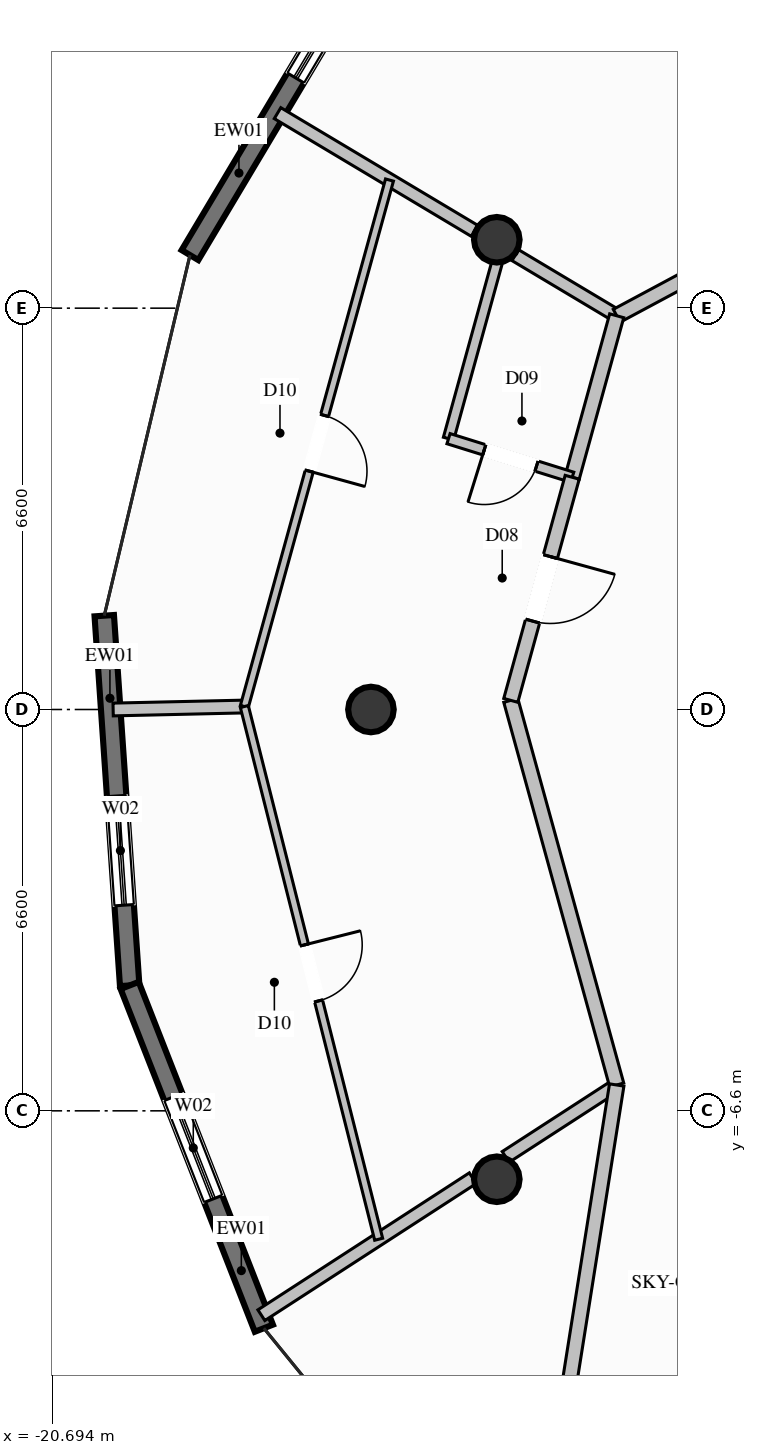
"""IFC4 building model, lengths in metres.
Left out: names, types, materials, properties, quantities, classifications, styles, units other than length and angle.
Written with IfcOpenShell. Run it as: python <this file> out.ifc"""

import sys

from ifc_helpers import new_model, si_unit, direction, frame, frame_2d, origin, origin_2d, place, context, subcontext, project, spatial, rectangle, circle, extrude, element, fill, save


model = new_model("IFC4")
c1 = context("Model", 3, precision=1e-05, world=origin(), true_north=direction((0.0, 1.0)))
c2 = subcontext(c1, "Body", "Model", "MODEL_VIEW")
j1 = project(units=[si_unit("LENGTHUNIT", "METRE"), si_unit("PLANEANGLEUNIT", "RADIAN")], contexts=[c1])
p1 = place(None, origin())
s1 = spatial("IfcSite", under=j1, at=p1, CompositionType="ELEMENT")
p2 = place(p1, origin())
s2 = spatial("IfcBuilding", under=s1, at=p2, CompositionType="ELEMENT")
p3 = place(p2, frame((0.0, 0.0, 293.4)))
s3 = spatial("IfcBuildingStorey", under=s2, at=p3, CompositionType="ELEMENT", Elevation=293.4)
for number, where, z_axis, x_axis in (
    (1, (-13.38, 7.725, 0.0), (0.0, 0.0, 1.0), (1.0, 0.0, 0.0)),
    (2, (-15.45, 0.0, 0.0), (0.0, 0.0, 1.0), (1.0, 0.0, 0.0)),
    (3, (-13.38, -7.725, 0.0), (0.0, 0.0, 1.0), (1.0, 0.0, 0.0)),
):
    element("IfcColumn", number, at=place(p3, frame(where, z_axis=z_axis, x_axis=x_axis)), inside=s3, PredefinedType="COLUMN", context=c2, shape_type="SweptSolid", body=[
        extrude(circle(Radius=0.375, at=origin_2d()), origin(), (0.0, 0.0, 1.0), 3.8),
    ])
p4 = place(p3, frame((-18.426, 7.473, 0.0), z_axis=(0.0, 0.0, 1.0), x_axis=(0.512459907896, 0.858711152134, 0.0)))
e4 = element("IfcWall", 4, at=p4, inside=s3, PredefinedType="SOLIDWALL", context=c2, shape_type="SweptSolid", body=[
    extrude(rectangle(XDim=6.053, YDim=0.32, at=frame_2d((3.027, 0.0))), origin(), (0.0, 0.0, 1.0), 3.57),
])
p5 = place(p4, frame((3.392, 0.0, 0.35)))
e5 = element("IfcOpeningElement", 5, at=p5, cuts=e4, PredefinedType="OPENING", context=c2, shape_type="SweptSolid", body=[
    extrude(rectangle(XDim=1.8, YDim=2.6, at=frame_2d((0.9, 1.3))), frame((0.0, 0.17, 0.0), z_axis=(0.0, -1.0, 0.0), x_axis=(1.0, 0.0, 0.0)), (0.0, 0.0, 1.0), 0.34),
])
p6 = place(p3, frame((-19.418, -4.538, 0.0), z_axis=(0.0, 0.0, 1.0), x_axis=(-0.068571155559, 0.997646228192, 0.0)))
e6 = element("IfcWall", 6, at=p6, inside=s3, PredefinedType="SOLIDWALL", context=c2, shape_type="SweptSolid", body=[
    extrude(rectangle(XDim=6.095, YDim=0.32, at=frame_2d((3.048, 0.0))), origin(), (0.0, 0.0, 1.0), 3.57),
])
p7 = place(p6, frame((1.323, 0.0, 0.35)))
e7 = element("IfcOpeningElement", 7, at=p7, cuts=e6, PredefinedType="OPENING", context=c2, shape_type="SweptSolid", body=[
    extrude(rectangle(XDim=1.8, YDim=2.6, at=frame_2d((0.9, 1.3))), frame((0.0, 0.17, 0.0), z_axis=(0.0, -1.0, 0.0), x_axis=(1.0, 0.0, 0.0)), (0.0, 0.0, 1.0), 0.34),
])
p8 = place(p3, frame((-17.211, -10.175, 0.0), z_axis=(0.0, 0.0, 1.0), x_axis=(-0.364580296342, 0.931171953787, 0.0)))
e8 = element("IfcWall", 8, at=p8, inside=s3, PredefinedType="SOLIDWALL", context=c2, shape_type="SweptSolid", body=[
    extrude(rectangle(XDim=6.054, YDim=0.32, at=frame_2d((3.027, 0.0))), origin(), (0.0, 0.0, 1.0), 3.57),
])
p9 = place(p8, frame((2.284, 0.0, 0.35)))
e9 = element("IfcOpeningElement", 9, at=p9, cuts=e8, PredefinedType="OPENING", context=c2, shape_type="SweptSolid", body=[
    extrude(rectangle(XDim=1.8, YDim=2.6, at=frame_2d((0.9, 1.3))), frame((0.0, 0.17, 0.0), z_axis=(0.0, -1.0, 0.0), x_axis=(1.0, 0.0, 0.0)), (0.0, 0.0, 1.0), 0.34),
])
p10 = place(p3, frame((-11.408, 6.475, 0.0), z_axis=(0.0, 0.0, 1.0), x_axis=(-0.858521768477, 0.512777118299, 0.0)))
e10 = element("IfcWall", 10, at=p10, inside=s3, PredefinedType="PARTITIONING", context=c2, shape_type="SweptSolid", body=[
    extrude(rectangle(XDim=1.944, YDim=0.21, at=frame_2d((0.972, 0.0))), origin(), (0.0, 0.0, 1.0), 3.011),
])
p11 = place(p3, frame((-13.747, 7.872, 0.0), z_axis=(0.0, 0.0, 1.0), x_axis=(-0.858496185015, 0.512819949216, 0.0)))
e11 = element("IfcWall", 11, at=p11, inside=s3, PredefinedType="PARTITIONING", context=c2, shape_type="SweptSolid", body=[
    extrude(rectangle(XDim=3.773, YDim=0.21, at=frame_2d((1.886, 0.0))), origin(), (0.0, 0.0, 1.0), 3.57),
])
p12 = place(p3, frame((-11.408, -6.175, 0.0), z_axis=(0.0, 0.0, 1.0), x_axis=(-0.83928100766, -0.543697885026, 0.0)))
e12 = element("IfcWall", 12, at=p12, inside=s3, PredefinedType="PARTITIONING", context=c2, shape_type="SweptSolid", body=[
    extrude(rectangle(XDim=2.176, YDim=0.21, at=frame_2d((1.088, 0.0))), origin(), (0.0, 0.0, 1.0), 3.011),
])
p13 = place(p3, frame((-13.775, -7.708, 0.0), z_axis=(0.0, 0.0, 1.0), x_axis=(-0.83923166981, -0.543774037987, 0.0)))
e13 = element("IfcWall", 13, at=p13, inside=s3, PredefinedType="PARTITIONING", context=c2, shape_type="SweptSolid", body=[
    extrude(rectangle(XDim=4.143, YDim=0.21, at=frame_2d((2.072, 0.0))), origin(), (0.0, 0.0, 1.0), 3.57),
])
p14 = place(p3, frame((-11.408, 6.475, 0.0), z_axis=(0.0, 0.0, 1.0), x_axis=(0.881394026477, 0.472381805418, 0.0)))
e14 = element("IfcWall", 14, at=p14, inside=s3, PredefinedType="PARTITIONING", context=c2, shape_type="SweptSolid", body=[
    extrude(rectangle(XDim=4.604, YDim=0.24, at=frame_2d((2.302, 0.0))), origin(), (0.0, 0.0, 1.0), 3.57),
])
p15 = place(p14, frame((1.802, 0.0, 0.0)))
e15 = element("IfcOpeningElement", 15, at=p15, cuts=e14, PredefinedType="OPENING", context=c2, shape_type="SweptSolid", body=[
    extrude(rectangle(XDim=1.0, YDim=2.2, at=frame_2d((0.5, 1.1))), frame((0.0, 0.13, 0.0), z_axis=(0.0, -1.0, 0.0), x_axis=(1.0, 0.0, 0.0)), (0.0, 0.0, 1.0), 0.26),
])
p16 = place(p3, frame((-11.408, 6.475, 0.0), z_axis=(0.0, 0.0, 1.0), x_axis=(-0.265673419644, -0.964063086159, 0.0)))
e16 = element("IfcWall", 16, at=p16, inside=s3, PredefinedType="PARTITIONING", context=c2, shape_type="SweptSolid", body=[
    extrude(rectangle(XDim=2.755, YDim=0.24, at=frame_2d((1.377, 0.0))), origin(), (0.0, 0.0, 1.0), 3.57),
])
p17 = place(p3, frame((-13.305, 7.608, 0.0), z_axis=(0.0, 0.0, 1.0), x_axis=(-0.265680279944, -0.964061195593, 0.0)))
e17 = element("IfcWall", 17, at=p17, inside=s3, PredefinedType="PLUMBINGWALL", context=c2, shape_type="SweptSolid", body=[
    extrude(rectangle(XDim=3.271, YDim=0.175, at=frame_2d((1.636, 0.0))), origin(), (0.0, 0.0, 1.0), 3.138),
])
p18 = place(p3, frame((-12.14, 3.819, 0.0), z_axis=(0.0, 0.0, 1.0), x_axis=(-0.954569631216, 0.297987951367, 0.0)))
e18 = element("IfcWall", 18, at=p18, inside=s3, PredefinedType="PLUMBINGWALL", context=c2, shape_type="SweptSolid", body=[
    extrude(rectangle(XDim=2.131, YDim=0.175, at=frame_2d((1.065, 0.0))), origin(), (0.0, 0.0, 1.0), 3.57),
])
p19 = place(p18, frame((0.615, 0.0, 0.0)))
e19 = element("IfcOpeningElement", 19, at=p19, cuts=e18, PredefinedType="OPENING", context=c2, shape_type="SweptSolid", body=[
    extrude(rectangle(XDim=0.9, YDim=2.1, at=frame_2d((0.45, 1.05))), frame((0.0, 0.098, 0.0), z_axis=(0.0, -1.0, 0.0), x_axis=(1.0, 0.0, 0.0)), (0.0, 0.0, 1.0), 0.195),
])
p20 = place(p3, frame((-17.532, 0.049, 0.0), z_axis=(0.0, 0.0, 1.0), x_axis=(-0.999741543501, -0.02273425164, 0.0)))
e20 = element("IfcWall", 20, at=p20, inside=s3, PredefinedType="PARTITIONING", context=c2, shape_type="SweptSolid", body=[
    extrude(rectangle(XDim=2.158, YDim=0.21, at=frame_2d((1.079, 0.0))), origin(), (0.0, 0.0, 1.0), 3.57),
])
p21 = place(p3, frame((-13.15, 0.15, 0.0), z_axis=(0.0, 0.0, 1.0), x_axis=(0.265522333736, -0.964104709193, 0.0)))
e21 = element("IfcWall", 21, at=p21, inside=s3, PredefinedType="PARTITIONING", context=c2, shape_type="SweptSolid", body=[
    extrude(rectangle(XDim=6.561, YDim=0.24, at=frame_2d((3.28, 0.0))), origin(), (0.0, 0.0, 1.0), 3.57),
])
p22 = place(p3, frame((-12.14, 3.819, 0.0), z_axis=(0.0, 0.0, 1.0), x_axis=(-0.265396531994, -0.964139347193, 0.0)))
e22 = element("IfcWall", 22, at=p22, inside=s3, PredefinedType="PARTITIONING", context=c2, shape_type="SweptSolid", body=[
    extrude(rectangle(XDim=3.806, YDim=0.24, at=frame_2d((1.903, 0.0))), origin(), (0.0, 0.0, 1.0), 3.57),
])
p23 = place(p22, frame((1.353, 0.0, 0.0)))
e23 = element("IfcOpeningElement", 23, at=p23, cuts=e22, PredefinedType="OPENING", context=c2, shape_type="SweptSolid", body=[
    extrude(rectangle(XDim=1.1, YDim=2.3, at=frame_2d((0.55, 1.15))), frame((0.0, 0.13, 0.0), z_axis=(0.0, -1.0, 0.0), x_axis=(1.0, 0.0, 0.0)), (0.0, 0.0, 1.0), 0.26),
])
p24 = place(p3, frame((-15.145, 8.707, 0.0), z_axis=(0.0, 0.0, 1.0), x_axis=(-0.265780037486, -0.964033698412, 0.0)))
e24 = element("IfcWall", 24, at=p24, inside=s3, PredefinedType="PARTITIONING", context=c2, shape_type="SweptSolid", body=[
    extrude(rectangle(XDim=8.981, YDim=0.135, at=frame_2d((4.49, 0.0))), origin(), (0.0, 0.0, 1.0), 3.57),
])
p25 = place(p24, frame((4.016, 0.0, 0.0)))
e25 = element("IfcOpeningElement", 25, at=p25, cuts=e24, PredefinedType="OPENING", context=c2, shape_type="SweptSolid", body=[
    extrude(rectangle(XDim=0.95, YDim=2.1, at=frame_2d((0.475, 1.05))), frame((0.0, 0.078, 0.0), z_axis=(0.0, -1.0, 0.0), x_axis=(1.0, 0.0, 0.0)), (0.0, 0.0, 1.0), 0.155),
])
p26 = place(p3, frame((-17.532, 0.049, 0.0), z_axis=(0.0, 0.0, 1.0), x_axis=(0.244487012049, -0.969652567129, 0.0)))
e26 = element("IfcWall", 26, at=p26, inside=s3, PredefinedType="PARTITIONING", context=c2, shape_type="SweptSolid", body=[
    extrude(rectangle(XDim=9.035, YDim=0.135, at=frame_2d((4.518, 0.0))), origin(), (0.0, 0.0, 1.0), 3.57),
])
p27 = place(p26, frame((4.043, 0.0, 0.0)))
e27 = element("IfcOpeningElement", 27, at=p27, cuts=e26, PredefinedType="OPENING", context=c2, shape_type="SweptSolid", body=[
    extrude(rectangle(XDim=0.95, YDim=2.1, at=frame_2d((0.475, 1.05))), frame((0.0, 0.078, 0.0), z_axis=(0.0, -1.0, 0.0), x_axis=(1.0, 0.0, 0.0)), (0.0, 0.0, 1.0), 0.155),
])
p28 = place(p3, frame((-11.408, -6.175, 0.0), z_axis=(0.0, 0.0, 1.0), x_axis=(-0.156636128869, -0.987656379078, 0.0)))
e28 = element("IfcWall", 28, at=p28, inside=s3, PredefinedType="PARTITIONING", context=c2, shape_type="SweptSolid", body=[
    extrude(rectangle(XDim=5.695, YDim=0.24, at=frame_2d((2.848, 0.0))), origin(), (0.0, 0.0, 1.0), 3.57),
])
p29 = place(p5, origin())
e29 = element("IfcWindow", 29, at=p29, inside=s3, PartitioningType="SINGLE_PANEL", PredefinedType="WINDOW", context=c2, shape_type="SweptSolid", body=[
    extrude(rectangle(XDim=1.8, YDim=2.6, at=frame_2d((0.9, 1.3))), frame((0.0, 0.03, 0.0), z_axis=(0.0, -1.0, 0.0), x_axis=(1.0, 0.0, 0.0)), (0.0, 0.0, 1.0), 0.06),
])
fill(e5, e29)
p30 = place(p7, origin())
e30 = element("IfcWindow", 30, at=p30, inside=s3, PartitioningType="SINGLE_PANEL", PredefinedType="WINDOW", context=c2, shape_type="SweptSolid", body=[
    extrude(rectangle(XDim=1.8, YDim=2.6, at=frame_2d((0.9, 1.3))), frame((0.0, 0.03, 0.0), z_axis=(0.0, -1.0, 0.0), x_axis=(1.0, 0.0, 0.0)), (0.0, 0.0, 1.0), 0.06),
])
fill(e7, e30)
p31 = place(p9, origin())
e31 = element("IfcWindow", 31, at=p31, inside=s3, PartitioningType="SINGLE_PANEL", PredefinedType="WINDOW", context=c2, shape_type="SweptSolid", body=[
    extrude(rectangle(XDim=1.8, YDim=2.6, at=frame_2d((0.9, 1.3))), frame((0.0, 0.03, 0.0), z_axis=(0.0, -1.0, 0.0), x_axis=(1.0, 0.0, 0.0)), (0.0, 0.0, 1.0), 0.06),
])
fill(e9, e31)
p32 = place(p19, origin())
e32 = element("IfcDoor", 32, at=p32, inside=s3, OperationType="SINGLE_SWING_RIGHT", PredefinedType="DOOR", context=c2, shape_type="SweptSolid", body=[
    extrude(rectangle(XDim=0.9, YDim=2.1, at=frame_2d((0.45, 1.05))), frame((0.0, 0.025, 0.0), z_axis=(0.0, -1.0, 0.0), x_axis=(1.0, 0.0, 0.0)), (0.0, 0.0, 1.0), 0.05),
])
fill(e19, e32)
p33 = place(p23, origin())
e33 = element("IfcDoor", 33, at=p33, inside=s3, OperationType="SINGLE_SWING_LEFT", PredefinedType="DOOR", context=c2, shape_type="SweptSolid", body=[
    extrude(rectangle(XDim=1.1, YDim=2.3, at=frame_2d((0.55, 1.15))), frame((0.0, 0.025, 0.0), z_axis=(0.0, -1.0, 0.0), x_axis=(1.0, 0.0, 0.0)), (0.0, 0.0, 1.0), 0.05),
])
fill(e23, e33)
p34 = place(p25, origin())
e34 = element("IfcDoor", 34, at=p34, inside=s3, OperationType="SINGLE_SWING_RIGHT", PredefinedType="DOOR", context=c2, shape_type="SweptSolid", body=[
    extrude(rectangle(XDim=0.95, YDim=2.1, at=frame_2d((0.475, 1.05))), frame((0.0, 0.025, 0.0), z_axis=(0.0, -1.0, 0.0), x_axis=(1.0, 0.0, 0.0)), (0.0, 0.0, 1.0), 0.05),
])
fill(e25, e34)
p35 = place(p27, origin())
e35 = element("IfcDoor", 35, at=p35, inside=s3, OperationType="SINGLE_SWING_LEFT", PredefinedType="DOOR", context=c2, shape_type="SweptSolid", body=[
    extrude(rectangle(XDim=0.95, YDim=2.1, at=frame_2d((0.475, 1.05))), frame((0.0, 0.025, 0.0), z_axis=(0.0, -1.0, 0.0), x_axis=(1.0, 0.0, 0.0)), (0.0, 0.0, 1.0), 0.05),
])
fill(e27, e35)
save(model, sys.argv[1])
